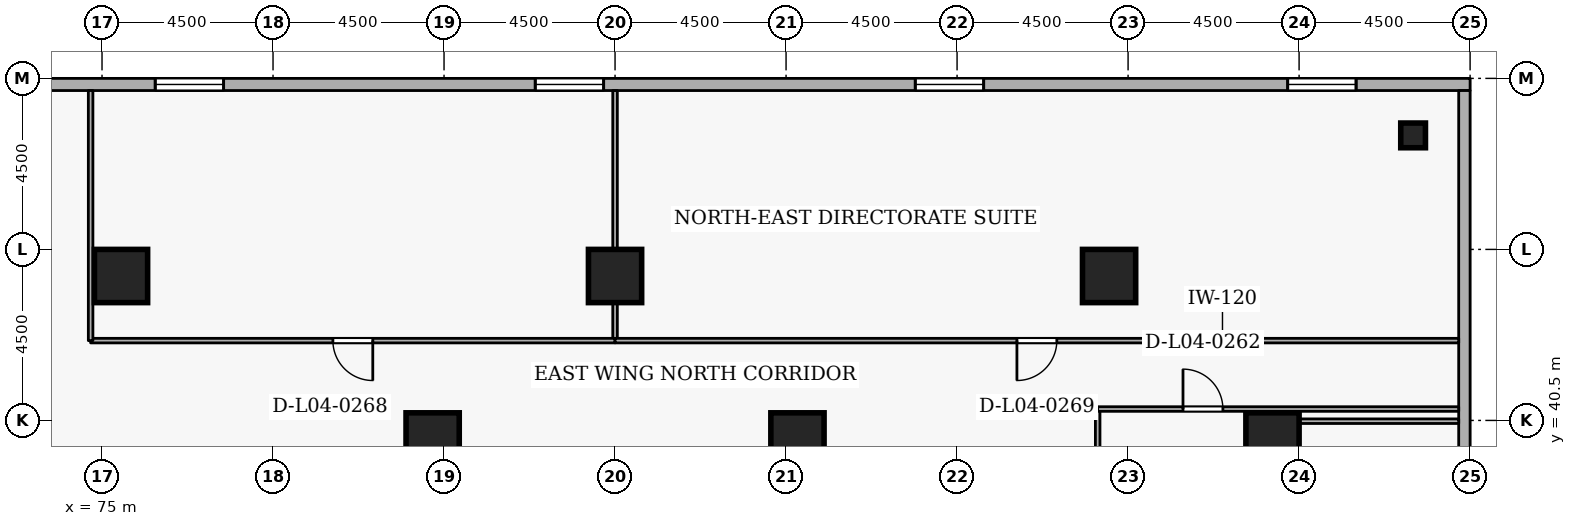
"""IFC4 building model, lengths in metres.
Left out: names, types, materials, properties, quantities, classifications, styles, units other than length and angle.
Written with IfcOpenShell. Run it as: python <this file> out.ifc"""

import sys

from ifc_helpers import new_model, si_unit, direction, frame, frame_2d, origin, origin_2d, place, context, subcontext, project, spatial, rectangle, extrude, element, fill, save


model = new_model("IFC4")
c1 = context("Model", 3, precision=1e-05, world=origin(), true_north=direction((0.0, 1.0)))
c2 = subcontext(c1, "Body", "Model", "MODEL_VIEW")
j1 = project(units=[si_unit("LENGTHUNIT", "METRE"), si_unit("PLANEANGLEUNIT", "RADIAN")], contexts=[c1])
p1 = place(None, origin())
s1 = spatial("IfcSite", under=j1, at=p1, CompositionType="ELEMENT")
p2 = place(p1, origin())
s2 = spatial("IfcBuilding", under=s1, at=p2, CompositionType="ELEMENT")
p3 = place(p2, frame((0.0, 0.0, 18.6)))
s3 = spatial("IfcBuildingStorey", under=s2, at=p3, CompositionType="ELEMENT", Elevation=18.6)
for number, where, z_axis, x_axis in (
    (1, (105.8, 40.0, 0.0), (0.0, 0.0, 1.0), (1.0, 0.0, 0.0)),
    (2, (101.5, 44.3, 0.0), (0.0, 0.0, 1.0), (1.0, 0.0, 0.0)),
    (3, (88.5, 44.3, 0.0), (0.0, 0.0, 1.0), (1.0, 0.0, 0.0)),
    (4, (75.5, 44.3, 0.0), (0.0, 0.0, 1.0), (1.0, 0.0, 0.0)),
    (5, (93.3, 40.0, 0.0), (0.0, 0.0, 1.0), (1.0, 0.0, 0.0)),
    (6, (83.7, 40.0, 0.0), (0.0, 0.0, 1.0), (1.0, 0.0, 0.0)),
):
    element("IfcColumn", number, at=place(p3, frame(where, z_axis=z_axis, x_axis=x_axis)), inside=s3, PredefinedType="COLUMN", context=c2, shape_type="SweptSolid", body=[
        extrude(rectangle(XDim=1.4, YDim=1.4, at=origin_2d()), origin(), (0.0, 0.0, 1.0), 4.5),
    ])
p4 = place(p3, frame((109.5, 48.0, 0.0), z_axis=(0.0, 0.0, 1.0), x_axis=(1.0, 0.0, 0.0)))
e7 = element("IfcColumn", 7, at=p4, inside=s3, PredefinedType="COLUMN", context=c2, shape_type="SweptSolid", body=[
    extrude(rectangle(XDim=0.65, YDim=0.65, at=origin_2d()), origin(), (0.0, 0.0, 1.0), 4.5),
])
p5 = place(p3, frame((111.0, 49.34, 0.0), z_axis=(0.0, 0.0, 1.0), x_axis=(-1.0, 0.0, 0.0)))
e8 = element("IfcWall", 8, at=p5, inside=s3, PredefinedType="STANDARD", context=c2, shape_type="SweptSolid", body=[
    extrude(rectangle(XDim=39.4, YDim=0.32, at=frame_2d((19.7, 0.0))), origin(), (0.0, 0.0, 1.0), 3.56),
])
p6 = place(p5, frame((3.0, 0.0, 0.78)))
e9 = element("IfcOpeningElement", 9, at=p6, cuts=e8, PredefinedType="OPENING", context=c2, shape_type="SweptSolid", body=[
    extrude(rectangle(XDim=1.8, YDim=2.15, at=frame_2d((0.9, 1.075))), frame((0.0, 0.17, 0.0), z_axis=(0.0, -1.0, 0.0), x_axis=(1.0, 0.0, 0.0)), (0.0, 0.0, 1.0), 0.34),
])
p7 = place(p5, frame((12.8, 0.0, 0.78)))
e10 = element("IfcOpeningElement", 10, at=p7, cuts=e8, PredefinedType="OPENING", context=c2, shape_type="SweptSolid", body=[
    extrude(rectangle(XDim=1.8, YDim=2.15, at=frame_2d((0.9, 1.075))), frame((0.0, 0.17, 0.0), z_axis=(0.0, -1.0, 0.0), x_axis=(1.0, 0.0, 0.0)), (0.0, 0.0, 1.0), 0.34),
])
p8 = place(p5, frame((22.8, 0.0, 0.78)))
e11 = element("IfcOpeningElement", 11, at=p8, cuts=e8, PredefinedType="OPENING", context=c2, shape_type="SweptSolid", body=[
    extrude(rectangle(XDim=1.8, YDim=2.15, at=frame_2d((0.9, 1.075))), frame((0.0, 0.17, 0.0), z_axis=(0.0, -1.0, 0.0), x_axis=(1.0, 0.0, 0.0)), (0.0, 0.0, 1.0), 0.34),
])
p9 = place(p5, frame((32.8, 0.0, 0.78)))
e12 = element("IfcOpeningElement", 12, at=p9, cuts=e8, PredefinedType="OPENING", context=c2, shape_type="SweptSolid", body=[
    extrude(rectangle(XDim=1.8, YDim=2.15, at=frame_2d((0.9, 1.075))), frame((0.0, 0.17, 0.0), z_axis=(0.0, -1.0, 0.0), x_axis=(1.0, 0.0, 0.0)), (0.0, 0.0, 1.0), 0.34),
])
p10 = place(p3, frame((110.85, 10.82, 0.0), z_axis=(0.0, 0.0, 1.0), x_axis=(0.0, 1.0, 0.0)))
e13 = element("IfcWall", 13, at=p10, inside=s3, PredefinedType="STANDARD", context=c2, shape_type="SweptSolid", body=[
    extrude(rectangle(XDim=38.36, YDim=0.3, at=frame_2d((19.18, 0.0))), origin(), (0.0, 0.0, 1.0), 3.56),
])
p11 = place(p3, frame((101.2, 27.0, 0.0), z_axis=(0.0, 0.0, 1.0), x_axis=(0.0, 1.0, 0.0)))
e14 = element("IfcWall", 14, at=p11, inside=s3, PredefinedType="PARTITIONING", context=c2, shape_type="SweptSolid", body=[
    extrude(rectangle(XDim=13.8, YDim=0.12, at=frame_2d((6.9, 0.0))), origin(), (0.0, 0.0, 1.0), 4.16),
])
p12 = place(p3, frame((101.2, 40.8, 0.0), z_axis=(0.0, 0.0, 1.0), x_axis=(1.0, 0.0, 0.0)))
e15 = element("IfcWall", 15, at=p12, inside=s3, PredefinedType="PARTITIONING", context=c2, shape_type="SweptSolid", body=[
    extrude(rectangle(XDim=9.5, YDim=0.12, at=frame_2d((4.75, 0.0))), origin(), (0.0, 0.0, 1.0), 4.16),
])
p13 = place(p12, frame((2.245, 0.0, 0.0)))
e16 = element("IfcOpeningElement", 16, at=p13, cuts=e15, PredefinedType="OPENING", context=c2, shape_type="SweptSolid", body=[
    extrude(rectangle(XDim=1.05, YDim=2.1, at=frame_2d((0.525, 1.05))), frame((0.0, 0.07, 0.0), z_axis=(0.0, -1.0, 0.0), x_axis=(1.0, 0.0, 0.0)), (0.0, 0.0, 1.0), 0.14),
])
p14 = place(p3, frame((110.7, 40.48, 0.0), z_axis=(0.0, 0.0, 1.0), x_axis=(-1.0, 0.0, 0.0)))
e17 = element("IfcWall", 17, at=p14, inside=s3, PredefinedType="PARTITIONING", context=c2, shape_type="SweptSolid", body=[
    extrude(rectangle(XDim=4.9, YDim=0.12, at=frame_2d((2.45, 0.0))), origin(), (0.0, 0.0, 1.0), 4.16),
])
p15 = place(p3, frame((88.5, 49.18, 0.0), z_axis=(0.0, 0.0, 1.0), x_axis=(0.0, -1.0, 0.0)))
e18 = element("IfcWall", 18, at=p15, inside=s3, PredefinedType="PARTITIONING", context=c2, shape_type="SweptSolid", body=[
    extrude(rectangle(XDim=6.58, YDim=0.12, at=frame_2d((3.29, 0.0))), origin(), (0.0, 0.0, 1.0), 4.16),
])
p16 = place(p3, frame((88.5, 42.6, 0.0), z_axis=(0.0, 0.0, 1.0), x_axis=(-1.0, 0.0, 0.0)))
e19 = element("IfcWall", 19, at=p16, inside=s3, PredefinedType="PARTITIONING", context=c2, shape_type="SweptSolid", body=[
    extrude(rectangle(XDim=13.8, YDim=0.12, at=frame_2d((6.9, 0.0))), origin(), (0.0, 0.0, 1.0), 4.16),
])
p17 = place(p16, frame((6.375, 0.0, 0.0)))
e20 = element("IfcOpeningElement", 20, at=p17, cuts=e19, PredefinedType="OPENING", context=c2, shape_type="SweptSolid", body=[
    extrude(rectangle(XDim=1.05, YDim=2.1, at=frame_2d((0.525, 1.05))), frame((0.0, 0.07, 0.0), z_axis=(0.0, -1.0, 0.0), x_axis=(1.0, 0.0, 0.0)), (0.0, 0.0, 1.0), 0.14),
])
p18 = place(p3, frame((74.7, 42.6, 0.0), z_axis=(0.0, 0.0, 1.0), x_axis=(0.0, 1.0, 0.0)))
e21 = element("IfcWall", 21, at=p18, inside=s3, PredefinedType="PARTITIONING", context=c2, shape_type="SweptSolid", body=[
    extrude(rectangle(XDim=6.58, YDim=0.12, at=frame_2d((3.29, 0.0))), origin(), (0.0, 0.0, 1.0), 4.16),
])
p19 = place(p3, frame((110.7, 42.6, 0.0), z_axis=(0.0, 0.0, 1.0), x_axis=(-1.0, 0.0, 0.0)))
e22 = element("IfcWall", 22, at=p19, inside=s3, PredefinedType="PARTITIONING", context=c2, shape_type="SweptSolid", body=[
    extrude(rectangle(XDim=22.2, YDim=0.12, at=frame_2d((11.1, 0.0))), origin(), (0.0, 0.0, 1.0), 4.16),
])
p20 = place(p19, frame((10.575, 0.0, 0.0)))
e23 = element("IfcOpeningElement", 23, at=p20, cuts=e22, PredefinedType="OPENING", context=c2, shape_type="SweptSolid", body=[
    extrude(rectangle(XDim=1.05, YDim=2.1, at=frame_2d((0.525, 1.05))), frame((0.0, 0.07, 0.0), z_axis=(0.0, -1.0, 0.0), x_axis=(1.0, 0.0, 0.0)), (0.0, 0.0, 1.0), 0.14),
])
p21 = place(p6, origin())
e24 = element("IfcWindow", 24, at=p21, inside=s3, PartitioningType="SINGLE_PANEL", PredefinedType="WINDOW", context=c2, shape_type="SweptSolid", body=[
    extrude(rectangle(XDim=1.8, YDim=2.15, at=frame_2d((0.9, 1.075))), frame((0.0, 0.03, 0.0), z_axis=(0.0, -1.0, 0.0), x_axis=(1.0, 0.0, 0.0)), (0.0, 0.0, 1.0), 0.06),
])
fill(e9, e24)
p22 = place(p7, origin())
e25 = element("IfcWindow", 25, at=p22, inside=s3, PartitioningType="SINGLE_PANEL", PredefinedType="WINDOW", context=c2, shape_type="SweptSolid", body=[
    extrude(rectangle(XDim=1.8, YDim=2.15, at=frame_2d((0.9, 1.075))), frame((0.0, 0.03, 0.0), z_axis=(0.0, -1.0, 0.0), x_axis=(1.0, 0.0, 0.0)), (0.0, 0.0, 1.0), 0.06),
])
fill(e10, e25)
p23 = place(p8, origin())
e26 = element("IfcWindow", 26, at=p23, inside=s3, PartitioningType="SINGLE_PANEL", PredefinedType="WINDOW", context=c2, shape_type="SweptSolid", body=[
    extrude(rectangle(XDim=1.8, YDim=2.15, at=frame_2d((0.9, 1.075))), frame((0.0, 0.03, 0.0), z_axis=(0.0, -1.0, 0.0), x_axis=(1.0, 0.0, 0.0)), (0.0, 0.0, 1.0), 0.06),
])
fill(e11, e26)
p24 = place(p9, origin())
e27 = element("IfcWindow", 27, at=p24, inside=s3, PartitioningType="SINGLE_PANEL", PredefinedType="WINDOW", context=c2, shape_type="SweptSolid", body=[
    extrude(rectangle(XDim=1.8, YDim=2.15, at=frame_2d((0.9, 1.075))), frame((0.0, 0.03, 0.0), z_axis=(0.0, -1.0, 0.0), x_axis=(1.0, 0.0, 0.0)), (0.0, 0.0, 1.0), 0.06),
])
fill(e12, e27)
p25 = place(p13, origin())
e28 = element("IfcDoor", 28, at=p25, inside=s3, OperationType="SINGLE_SWING_LEFT", PredefinedType="DOOR", context=c2, shape_type="SweptSolid", body=[
    extrude(rectangle(XDim=1.05, YDim=2.1, at=frame_2d((0.525, 1.05))), frame((0.0, 0.025, 0.0), z_axis=(0.0, -1.0, 0.0), x_axis=(1.0, 0.0, 0.0)), (0.0, 0.0, 1.0), 0.05),
])
fill(e16, e28)
p26 = place(p17, origin())
e29 = element("IfcDoor", 29, at=p26, inside=s3, OperationType="SINGLE_SWING_LEFT", PredefinedType="DOOR", context=c2, shape_type="SweptSolid", body=[
    extrude(rectangle(XDim=1.05, YDim=2.1, at=frame_2d((0.525, 1.05))), frame((0.0, 0.025, 0.0), z_axis=(0.0, -1.0, 0.0), x_axis=(1.0, 0.0, 0.0)), (0.0, 0.0, 1.0), 0.05),
])
fill(e20, e29)
p27 = place(p20, origin())
e30 = element("IfcDoor", 30, at=p27, inside=s3, OperationType="SINGLE_SWING_RIGHT", PredefinedType="DOOR", context=c2, shape_type="SweptSolid", body=[
    extrude(rectangle(XDim=1.05, YDim=2.1, at=frame_2d((0.525, 1.05))), frame((0.0, 0.025, 0.0), z_axis=(0.0, -1.0, 0.0), x_axis=(1.0, 0.0, 0.0)), (0.0, 0.0, 1.0), 0.05),
])
fill(e23, e30)
save(model, sys.argv[1])
